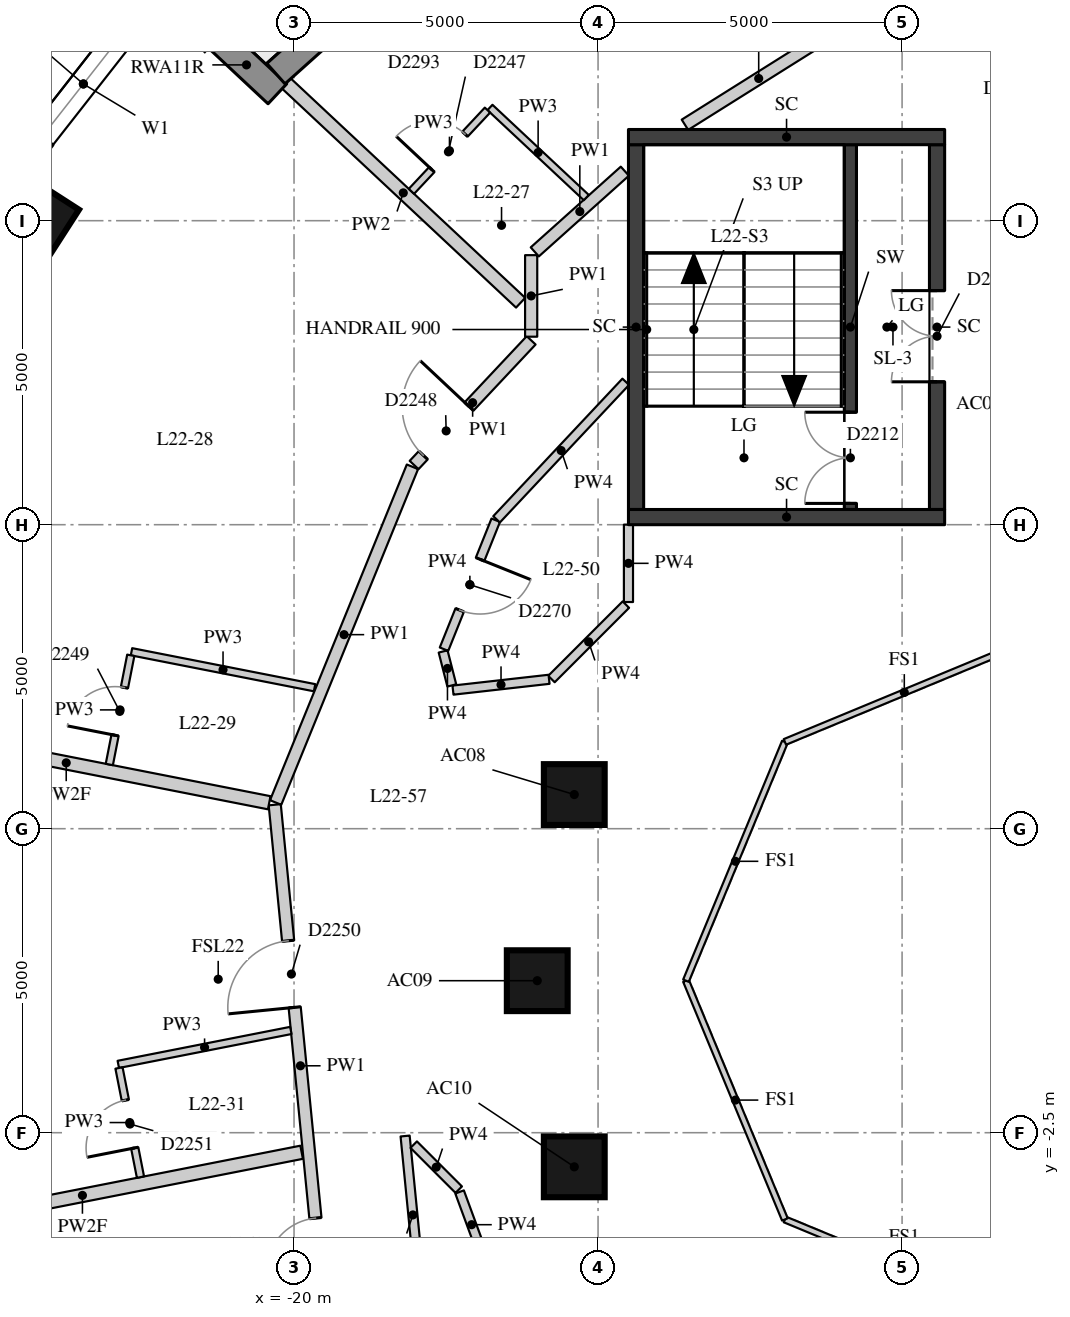
"""IFC4 building model, lengths in metres.
Left out: names, types, materials, properties, quantities, classifications, styles, units other than length and angle.
Written with IfcOpenShell. Run it as: python <this file> out.ifc"""

import sys

from ifc_helpers import new_model, si_unit, direction, frame, frame_2d, origin, origin_2d, place, context, subcontext, project, spatial, rectangle, extrude, element, fill, save


model = new_model("IFC4")
c1 = context("Model", 3, precision=1e-05, world=origin(), true_north=direction((0.0, 1.0)))
c2 = subcontext(c1, "Body", "Model", "MODEL_VIEW")
j1 = project(units=[si_unit("LENGTHUNIT", "METRE"), si_unit("PLANEANGLEUNIT", "RADIAN")], contexts=[c1])
p1 = place(None, origin())
s1 = spatial("IfcSite", under=j1, at=p1, CompositionType="ELEMENT")
p2 = place(p1, origin())
s2 = spatial("IfcBuilding", under=s1, at=p2, CompositionType="ELEMENT")
p3 = place(p2, frame((0.0, 0.0, 81.1)))
s3 = spatial("IfcBuildingStorey", under=s2, at=p3, CompositionType="ELEMENT", Elevation=81.1)
p4 = place(p3, frame((-24.465, 12.625, 0.0), z_axis=(0.0, 0.0, 1.0), x_axis=(-0.840753565229, 0.541417992456, 0.0)))
e1 = element("IfcColumn", 1, at=p4, inside=s3, PredefinedType="COLUMN", context=c2, shape_type="SweptSolid", body=[
    extrude(rectangle(XDim=1.5, YDim=1.1, at=origin_2d()), origin(), (0.0, 0.0, 1.0), 3.3),
])
for number, where, z_axis, x_axis in (
    (2, (-15.391, 3.062, 0.0), (0.0, 0.0, 1.0), (1.0, 0.0, 0.0)),
    (3, (-16.0, 0.0, 0.0), (0.0, 0.0, 1.0), (1.0, 0.0, 0.0)),
    (4, (-15.391, -3.062, 0.0), (0.0, 0.0, 1.0), (1.0, 0.0, 0.0)),
):
    element("IfcColumn", number, at=place(p3, frame(where, z_axis=z_axis, x_axis=x_axis)), inside=s3, PredefinedType="COLUMN", context=c2, shape_type="SweptSolid", body=[
        extrude(rectangle(XDim=1.0, YDim=1.0, at=origin_2d()), origin(), (0.0, 0.0, 1.0), 3.3),
    ])
p5 = place(p3, frame((-22.352, 16.17, 0.0), z_axis=(0.0, 0.0, 1.0), x_axis=(-0.616661975264, -0.787228053529, 0.0)))
e5 = element("IfcWall", 5, at=p5, inside=s3, PredefinedType="SOLIDWALL", context=c2, shape_type="SweptSolid", body=[
    extrude(rectangle(XDim=3.61, YDim=0.45, at=frame_2d((1.805, 0.0))), origin(), (0.0, 0.0, 1.0), 2.85),
])
p6 = place(p5, frame((0.705, 0.0, 0.4)))
e6 = element("IfcOpeningElement", 6, at=p6, cuts=e5, PredefinedType="OPENING", context=c2, shape_type="SweptSolid", body=[
    extrude(rectangle(XDim=2.2, YDim=1.75, at=frame_2d((1.1, 0.875))), frame((0.0, 0.235, 0.0), z_axis=(0.0, -1.0, 0.0), x_axis=(1.0, 0.0, 0.0)), (0.0, 0.0, 1.0), 0.47),
])
p7 = place(p3, frame((-21.289, 15.538, 0.0), z_axis=(0.0, 0.0, 1.0), x_axis=(0.730149942784, -0.683286953668, 0.0)))
e7 = element("IfcWall", 7, at=p7, inside=s3, PredefinedType="SOLIDWALL", context=c2, shape_type="SweptSolid", body=[
    extrude(rectangle(XDim=1.391, YDim=0.45, at=frame_2d((0.695, 0.0))), origin(), (0.0, 0.0, 1.0), 2.85),
])
p8 = place(p3, frame((-17.048, 17.832, 0.0), z_axis=(0.0, 0.0, 1.0), x_axis=(-0.744619286768, -0.667489413978, 0.0)))
e8 = element("IfcWall", 8, at=p8, inside=s3, PredefinedType="SOLIDWALL", context=c2, shape_type="SweptSolid", body=[
    extrude(rectangle(XDim=4.365, YDim=0.45, at=frame_2d((2.183, 0.0))), origin(), (0.0, 0.0, 1.0), 2.85),
])
p9 = place(p8, frame((1.107, 0.0, 0.4)))
e9 = element("IfcOpeningElement", 9, at=p9, cuts=e8, PredefinedType="OPENING", context=c2, shape_type="SweptSolid", body=[
    extrude(rectangle(XDim=1.0, YDim=1.75, at=frame_2d((0.5, 0.875))), frame((0.0, 0.235, 0.0), z_axis=(0.0, -1.0, 0.0), x_axis=(1.0, 0.0, 0.0)), (0.0, 0.0, 1.0), 0.47),
])
p10 = place(p8, frame((2.258, 0.0, 0.0)))
e10 = element("IfcOpeningElement", 10, at=p10, cuts=e8, PredefinedType="OPENING", context=c2, shape_type="SweptSolid", body=[
    extrude(rectangle(XDim=1.0, YDim=2.15, at=frame_2d((0.5, 1.075))), frame((0.0, 0.235, 0.0), z_axis=(0.0, -1.0, 0.0), x_axis=(1.0, 0.0, 0.0)), (0.0, 0.0, 1.0), 0.47),
])
p11 = place(p3, frame((-10.85, 7.75, 0.0), z_axis=(0.0, 0.0, 1.0), x_axis=(0.0, 1.0, 0.0)))
e11 = element("IfcWall", 11, at=p11, inside=s3, PredefinedType="SHEAR", context=c2, shape_type="SweptSolid", body=[
    extrude(rectangle(XDim=6.0, YDim=0.2, at=frame_2d((3.0, 0.0))), origin(), (0.0, 0.0, 1.0), 2.85),
])
p12 = place(p11, frame((0.1, 0.0, 0.0)))
e12 = element("IfcOpeningElement", 12, at=p12, cuts=e11, PredefinedType="OPENING", context=c2, shape_type="SweptSolid", body=[
    extrude(rectangle(XDim=1.5, YDim=2.1, at=frame_2d((0.75, 1.05))), frame((0.0, 0.11, 0.0), z_axis=(0.0, -1.0, 0.0), x_axis=(1.0, 0.0, 0.0)), (0.0, 0.0, 1.0), 0.22),
])
p13 = place(p3, frame((-14.375, 7.75, -0.28), z_axis=(0.0, 0.0, 1.0), x_axis=(0.0, 1.0, 0.0)))
e13 = element("IfcWall", 13, at=p13, inside=s3, PredefinedType="SHEAR", context=c2, shape_type="SweptSolid", body=[
    extrude(rectangle(XDim=6.0, YDim=0.25, at=frame_2d((3.0, 0.0))), origin(), (0.0, 0.0, 1.0), 3.13),
])
p14 = place(p3, frame((-9.425, 7.75, -0.28), z_axis=(0.0, 0.0, 1.0), x_axis=(0.0, 1.0, 0.0)))
e14 = element("IfcWall", 14, at=p14, inside=s3, PredefinedType="SHEAR", context=c2, shape_type="SweptSolid", body=[
    extrude(rectangle(XDim=6.0, YDim=0.25, at=frame_2d((3.0, 0.0))), origin(), (0.0, 0.0, 1.0), 3.13),
])
p15 = place(p14, frame((2.1, 0.0, 0.28)))
e15 = element("IfcOpeningElement", 15, at=p15, cuts=e14, PredefinedType="OPENING", context=c2, shape_type="SweptSolid", body=[
    extrude(rectangle(XDim=1.5, YDim=2.1, at=frame_2d((0.75, 1.05))), frame((0.0, 0.135, 0.0), z_axis=(0.0, -1.0, 0.0), x_axis=(1.0, 0.0, 0.0)), (0.0, 0.0, 1.0), 0.27),
])
for number, where, z_axis, x_axis in (
    (16, (-14.5, 13.875, -0.28), (0.0, 0.0, 1.0), (1.0, 0.0, 0.0)),
    (17, (-14.5, 7.625, -0.28), (0.0, 0.0, 1.0), (1.0, 0.0, 0.0)),
):
    element("IfcWall", number, at=place(p3, frame(where, z_axis=z_axis, x_axis=x_axis)), inside=s3, PredefinedType="SHEAR", context=c2, shape_type="SweptSolid", body=[
        extrude(rectangle(XDim=5.2, YDim=0.25, at=frame_2d((2.6, 0.0))), origin(), (0.0, 0.0, 1.0), 3.13),
    ])
p16 = place(p3, frame((-19.472, -5.693, 0.0), z_axis=(0.0, 0.0, 1.0), x_axis=(-0.097987963337, 0.995187599923, 0.0)))
e18 = element("IfcWall", 18, at=p16, inside=s3, PredefinedType="PARTITIONING", context=c2, shape_type="SweptSolid", body=[
    extrude(rectangle(XDim=8.628, YDim=0.2, at=frame_2d((4.314, 0.0))), origin(), (0.0, 0.0, 1.0), 2.85),
])
p17 = place(p16, frame((5.28, 0.0, 0.0)))
e19 = element("IfcOpeningElement", 19, at=p17, cuts=e18, PredefinedType="OPENING", context=c2, shape_type="SweptSolid", body=[
    extrude(rectangle(XDim=1.1, YDim=2.1, at=frame_2d((0.55, 1.05))), frame((0.0, 0.11, 0.0), z_axis=(0.0, -1.0, 0.0), x_axis=(1.0, 0.0, 0.0)), (0.0, 0.0, 1.0), 0.22),
])
p18 = place(p16, frame((0.896, 0.0, 0.0)))
e20 = element("IfcOpeningElement", 20, at=p18, cuts=e18, PredefinedType="OPENING", context=c2, shape_type="SweptSolid", body=[
    extrude(rectangle(XDim=0.9, YDim=2.1, at=frame_2d((0.45, 1.05))), frame((0.0, 0.11, 0.0), z_axis=(0.0, -1.0, 0.0), x_axis=(1.0, 0.0, 0.0)), (0.0, 0.0, 1.0), 0.22),
])
p19 = place(p3, frame((-20.302, 2.931, 0.0), z_axis=(0.0, 0.0, 1.0), x_axis=(0.377348916571, 0.926071160961, 0.0)))
e21 = element("IfcWall", 21, at=p19, inside=s3, PredefinedType="PARTITIONING", context=c2, shape_type="SweptSolid", body=[
    extrude(rectangle(XDim=5.962, YDim=0.2, at=frame_2d((2.981, 0.0))), origin(), (0.0, 0.0, 1.0), 2.85),
])
p20 = place(p3, frame((-18.025, 8.481, 0.0), z_axis=(0.0, 0.0, 1.0), x_axis=(0.684446266357, 0.729063308958, 0.0)))
e22 = element("IfcWall", 22, at=p20, inside=s3, PredefinedType="PARTITIONING", context=c2, shape_type="SweptSolid", body=[
    extrude(rectangle(XDim=2.812, YDim=0.2, at=frame_2d((1.406, 0.0))), origin(), (0.0, 0.0, 1.0), 2.85),
])
p21 = place(p20, frame((0.22, 0.0, 0.0)))
e23 = element("IfcOpeningElement", 23, at=p21, cuts=e22, PredefinedType="OPENING", context=c2, shape_type="SweptSolid", body=[
    extrude(rectangle(XDim=1.1, YDim=2.1, at=frame_2d((0.55, 1.05))), frame((0.0, 0.11, 0.0), z_axis=(0.0, -1.0, 0.0), x_axis=(1.0, 0.0, 0.0)), (0.0, 0.0, 1.0), 0.22),
])
p22 = place(p3, frame((-16.1, 10.592, 0.0), z_axis=(0.0, 0.0, 1.0), x_axis=(0.0, 1.0, 0.0)))
e24 = element("IfcWall", 24, at=p22, inside=s3, PredefinedType="PARTITIONING", context=c2, shape_type="SweptSolid", body=[
    extrude(rectangle(XDim=1.341, YDim=0.2, at=frame_2d((0.67, 0.0))), origin(), (0.0, 0.0, 1.0), 2.85),
])
p23 = place(p3, frame((-16.041, 11.987, 0.0), z_axis=(0.0, 0.0, 1.0), x_axis=(0.744714584968, 0.66738308859, 0.0)))
e25 = element("IfcWall", 25, at=p23, inside=s3, PredefinedType="PARTITIONING", context=c2, shape_type="SweptSolid", body=[
    extrude(rectangle(XDim=1.989, YDim=0.2, at=frame_2d((0.995, 0.0))), origin(), (0.0, 0.0, 1.0), 2.85),
])
p24 = place(p3, frame((-13.571, 14.077, 0.0), z_axis=(0.0, 0.0, 1.0), x_axis=(0.84693819774, 0.53169134769, 0.0)))
e26 = element("IfcWall", 26, at=p24, inside=s3, PredefinedType="PARTITIONING", context=c2, shape_type="SweptSolid", body=[
    extrude(rectangle(XDim=2.864, YDim=0.2, at=frame_2d((1.432, 0.0))), origin(), (0.0, 0.0, 1.0), 2.85),
])
p25 = place(p3, frame((-14.5, 7.501, 0.0), z_axis=(0.0, 0.0, 1.0), x_axis=(0.0, -1.0, 0.0)))
e27 = element("IfcWall", 27, at=p25, inside=s3, PredefinedType="PARTITIONING", context=c2, shape_type="SweptSolid", body=[
    extrude(rectangle(XDim=1.273, YDim=0.15, at=frame_2d((0.636, 0.0))), origin(), (0.0, 0.0, 1.0), 2.85),
])
p26 = place(p3, frame((-14.542, 6.186, 0.0), z_axis=(0.0, 0.0, 1.0), x_axis=(-0.707036257397, -0.707177297943, 0.0)))
e28 = element("IfcWall", 28, at=p26, inside=s3, PredefinedType="PARTITIONING", context=c2, shape_type="SweptSolid", body=[
    extrude(rectangle(XDim=1.731, YDim=0.15, at=frame_2d((0.865, 0.0))), origin(), (0.0, 0.0, 1.0), 2.85),
])
p27 = place(p3, frame((-15.806, 4.957, 0.0), z_axis=(0.0, 0.0, 1.0), x_axis=(-0.993714030989, -0.111948312253, 0.0)))
e29 = element("IfcWall", 29, at=p27, inside=s3, PredefinedType="PARTITIONING", context=c2, shape_type="SweptSolid", body=[
    extrude(rectangle(XDim=1.59, YDim=0.15, at=frame_2d((0.795, 0.0))), origin(), (0.0, 0.0, 1.0), 2.85),
])
p28 = place(p3, frame((-17.405, 4.856, 0.0), z_axis=(0.0, 0.0, 1.0), x_axis=(-0.247510009529, 0.968885336447, 0.0)))
e30 = element("IfcWall", 30, at=p28, inside=s3, PredefinedType="PARTITIONING", context=c2, shape_type="SweptSolid", body=[
    extrude(rectangle(XDim=0.577, YDim=0.15, at=frame_2d((0.289, 0.0))), origin(), (0.0, 0.0, 1.0), 2.85),
])
p29 = place(p3, frame((-17.533, 5.452, 0.0), z_axis=(0.0, 0.0, 1.0), x_axis=(0.372293007078, 0.928115249783, 0.0)))
e31 = element("IfcWall", 31, at=p29, inside=s3, PredefinedType="PARTITIONING", context=c2, shape_type="SweptSolid", body=[
    extrude(rectangle(XDim=2.285, YDim=0.15, at=frame_2d((1.143, 0.0))), origin(), (0.0, 0.0, 1.0), 2.85),
])
p30 = place(p29, frame((0.693, 0.0, 0.0)))
e32 = element("IfcOpeningElement", 32, at=p30, cuts=e31, PredefinedType="OPENING", context=c2, shape_type="SweptSolid", body=[
    extrude(rectangle(XDim=0.9, YDim=2.1, at=frame_2d((0.45, 1.05))), frame((0.0, 0.085, 0.0), z_axis=(0.0, -1.0, 0.0), x_axis=(1.0, 0.0, 0.0)), (0.0, 0.0, 1.0), 0.17),
])
p31 = place(p3, frame((-16.669, 7.588, 0.0), z_axis=(0.0, 0.0, 1.0), x_axis=(0.684493083222, 0.729019354353, 0.0)))
e33 = element("IfcWall", 33, at=p31, inside=s3, PredefinedType="PARTITIONING", context=c2, shape_type="SweptSolid", body=[
    extrude(rectangle(XDim=3.104, YDim=0.15, at=frame_2d((1.552, 0.0))), origin(), (0.0, 0.0, 1.0), 2.85),
])
p32 = place(p3, frame((-17.917, -5.15, 0.0), z_axis=(0.0, 0.0, 1.0), x_axis=(-0.098011382053, 0.995185293796, 0.0)))
e34 = element("IfcWall", 34, at=p32, inside=s3, PredefinedType="PARTITIONING", context=c2, shape_type="SweptSolid", body=[
    extrude(rectangle(XDim=2.608, YDim=0.15, at=frame_2d((1.304, 0.0))), origin(), (0.0, 0.0, 1.0), 2.85),
])
p33 = place(p3, frame((-18.031, -2.696, 0.0), z_axis=(0.0, 0.0, 1.0), x_axis=(0.706990221924, -0.707223321239, 0.0)))
e35 = element("IfcWall", 35, at=p33, inside=s3, PredefinedType="PARTITIONING", context=c2, shape_type="SweptSolid", body=[
    extrude(rectangle(XDim=1.047, YDim=0.15, at=frame_2d((0.524, 0.0))), origin(), (0.0, 0.0, 1.0), 2.85),
])
p34 = place(p3, frame((-17.277, -3.475, 0.0), z_axis=(0.0, 0.0, 1.0), x_axis=(0.345498312946, -0.938419370938, 0.0)))
e36 = element("IfcWall", 36, at=p34, inside=s3, PredefinedType="PARTITIONING", context=c2, shape_type="SweptSolid", body=[
    extrude(rectangle(XDim=1.147, YDim=0.15, at=frame_2d((0.574, 0.0))), origin(), (0.0, 0.0, 1.0), 2.85),
])
p35 = place(p3, frame((-20.133, 14.764, 0.0), z_axis=(0.0, 0.0, 1.0), x_axis=(0.730064043032, -0.68337873326, 0.0)))
e37 = element("IfcWall", 37, at=p35, inside=s3, PredefinedType="PARTITIONING", context=c2, shape_type="SweptSolid", body=[
    extrude(rectangle(XDim=5.287, YDim=0.22, at=frame_2d((2.644, 0.0))), origin(), (0.0, 0.0, 1.0), 2.85),
])
p36 = place(p3, frame((-27.085, 4.24, 0.0), z_axis=(0.0, 0.0, 1.0), x_axis=(0.981200805451, -0.192989583608, 0.0)))
e38 = element("IfcWall", 38, at=p36, inside=s3, PredefinedType="PARTITIONING", context=c2, shape_type="SweptSolid", body=[
    extrude(rectangle(XDim=6.805, YDim=0.22, at=frame_2d((3.402, 0.0))), origin(), (0.0, 0.0, 1.0), 2.3),
])
p37 = place(p3, frame((-27.085, -4.24, 0.0), z_axis=(0.0, 0.0, 1.0), x_axis=(0.981198066788, 0.193003507042, 0.0)))
e39 = element("IfcWall", 39, at=p37, inside=s3, PredefinedType="PARTITIONING", context=c2, shape_type="SweptSolid", body=[
    extrude(rectangle(XDim=7.348, YDim=0.22, at=frame_2d((3.674, 0.0))), origin(), (0.0, 0.0, 1.0), 2.3),
])
p38 = place(p3, frame((-15.194, 12.88, 0.0), z_axis=(0.0, 0.0, 1.0), x_axis=(-0.730070370792, 0.683371973153, 0.0)))
e40 = element("IfcWall", 40, at=p38, inside=s3, PredefinedType="PARTITIONING", context=c2, shape_type="SweptSolid", body=[
    extrude(rectangle(XDim=2.17, YDim=0.12, at=frame_2d((1.085, 0.0))), origin(), (0.0, 0.0, 1.0), 2.85),
])
p39 = place(p3, frame((-19.662, 4.819, 0.0), z_axis=(0.0, 0.0, 1.0), x_axis=(-0.981227049162, 0.192856106963, 0.0)))
e41 = element("IfcWall", 41, at=p39, inside=s3, PredefinedType="PARTITIONING", context=c2, shape_type="SweptSolid", body=[
    extrude(rectangle(XDim=3.069, YDim=0.12, at=frame_2d((1.534, 0.0))), origin(), (0.0, 0.0, 1.0), 2.85),
])
p40 = place(p3, frame((-20.052, -0.818, 0.0), z_axis=(0.0, 0.0, 1.0), x_axis=(-0.981205462312, -0.192965905613, 0.0)))
e42 = element("IfcWall", 42, at=p40, inside=s3, PredefinedType="PARTITIONING", context=c2, shape_type="SweptSolid", body=[
    extrude(rectangle(XDim=2.892, YDim=0.12, at=frame_2d((1.446, 0.0))), origin(), (0.0, 0.0, 1.0), 2.85),
])
p41 = place(p3, frame((-16.819, 14.319, 0.0), z_axis=(0.0, 0.0, 1.0), x_axis=(-0.683372850006, -0.730069550026, 0.0)))
e43 = element("IfcWall", 43, at=p41, inside=s3, PredefinedType="PARTITIONING", context=c2, shape_type="SweptSolid", body=[
    extrude(rectangle(XDim=1.83, YDim=0.12, at=frame_2d((0.915, 0.0))), origin(), (0.0, 0.0, 1.0), 2.85),
])
p42 = place(p41, frame((0.54, 0.0, 0.0)))
e44 = element("IfcOpeningElement", 44, at=p42, cuts=e43, PredefinedType="OPENING", context=c2, shape_type="SweptSolid", body=[
    extrude(rectangle(XDim=0.8, YDim=2.1, at=frame_2d((0.4, 1.05))), frame((0.0, 0.07, 0.0), z_axis=(0.0, -1.0, 0.0), x_axis=(1.0, 0.0, 0.0)), (0.0, 0.0, 1.0), 0.14),
])
p43 = place(p3, frame((-22.685, 5.352, 0.0), z_axis=(0.0, 0.0, 1.0), x_axis=(-0.192908160061, -0.981216816907, 0.0)))
e45 = element("IfcWall", 45, at=p43, inside=s3, PredefinedType="PARTITIONING", context=c2, shape_type="SweptSolid", body=[
    extrude(rectangle(XDim=1.83, YDim=0.12, at=frame_2d((0.915, 0.0))), origin(), (0.0, 0.0, 1.0), 2.85),
])
p44 = place(p43, frame((0.54, 0.0, 0.0)))
e46 = element("IfcOpeningElement", 46, at=p44, cuts=e45, PredefinedType="OPENING", context=c2, shape_type="SweptSolid", body=[
    extrude(rectangle(XDim=0.8, YDim=2.1, at=frame_2d((0.4, 1.05))), frame((0.0, 0.07, 0.0), z_axis=(0.0, -1.0, 0.0), x_axis=(1.0, 0.0, 0.0)), (0.0, 0.0, 1.0), 0.14),
])
p45 = place(p3, frame((-22.879, -1.435, 0.0), z_axis=(0.0, 0.0, 1.0), x_axis=(0.193036598643, -0.981191557029, 0.0)))
e47 = element("IfcWall", 47, at=p45, inside=s3, PredefinedType="PARTITIONING", context=c2, shape_type="SweptSolid", body=[
    extrude(rectangle(XDim=1.83, YDim=0.12, at=frame_2d((0.915, 0.0))), origin(), (0.0, 0.0, 1.0), 2.85),
])
p46 = place(p45, frame((0.54, 0.0, 0.0)))
e48 = element("IfcOpeningElement", 48, at=p46, cuts=e47, PredefinedType="OPENING", context=c2, shape_type="SweptSolid", body=[
    extrude(rectangle(XDim=0.8, YDim=2.1, at=frame_2d((0.4, 1.05))), frame((0.0, 0.07, 0.0), z_axis=(0.0, -1.0, 0.0), x_axis=(1.0, 0.0, 0.0)), (0.0, 0.0, 1.0), 0.14),
])
for number, where, z_axis, x_axis in (
    (49, (-8.0, -5.554, 0.0), (0.0, 0.0, 1.0), (-0.924, 0.383, 0.0)),
    (50, (-11.927, -3.927, 0.0), (0.0, 0.0, 1.0), (-0.383, 0.924, 0.0)),
    (51, (-13.554, 0.0, 0.0), (0.0, 0.0, 1.0), (0.383, 0.924, 0.0)),
    (52, (-11.927, 3.927, 0.0), (0.0, 0.0, 1.0), (0.924, 0.383, 0.0)),
):
    element("IfcWall", number, at=place(p3, frame(where, z_axis=z_axis, x_axis=x_axis)), inside=s3, PredefinedType="PARTITIONING", context=c2, shape_type="SweptSolid", body=[
        extrude(rectangle(XDim=4.251, YDim=0.1, at=frame_2d((2.125, 0.0))), origin(), (0.0, 0.0, 1.0), 2.85),
    ])
p47 = place(p6, origin())
e53 = element("IfcWindow", 53, at=p47, inside=s3, PartitioningType="SINGLE_PANEL", PredefinedType="WINDOW", context=c2, shape_type="SweptSolid", body=[
    extrude(rectangle(XDim=2.2, YDim=1.75, at=frame_2d((1.1, 0.875))), frame((0.0, 0.035, 0.0), z_axis=(0.0, -1.0, 0.0), x_axis=(1.0, 0.0, 0.0)), (0.0, 0.0, 1.0), 0.06),
])
fill(e6, e53)
p48 = place(p12, origin())
e54 = element("IfcDoor", 54, at=p48, inside=s3, OperationType="DOUBLE_DOOR_SINGLE_SWING", PredefinedType="DOOR", context=c2, shape_type="SweptSolid", body=[
    extrude(rectangle(XDim=1.5, YDim=2.1, at=frame_2d((0.75, 1.05))), frame((0.0, 0.025, 0.0), z_axis=(0.0, -1.0, 0.0), x_axis=(1.0, 0.0, 0.0)), (0.0, 0.0, 1.0), 0.05),
])
fill(e12, e54)
p49 = place(p15, origin())
e55 = element("IfcDoor", 55, at=p49, inside=s3, OperationType="DOUBLE_DOOR_SINGLE_SWING", PredefinedType="DOOR", context=c2, shape_type="SweptSolid", body=[
    extrude(rectangle(XDim=1.5, YDim=2.1, at=frame_2d((0.75, 1.05))), frame((0.0, 0.025, 0.0), z_axis=(0.0, -1.0, 0.0), x_axis=(1.0, 0.0, 0.0)), (0.0, 0.0, 1.0), 0.05),
])
fill(e15, e55)
p50 = place(p42, origin())
e56 = element("IfcDoor", 56, at=p50, inside=s3, OperationType="SINGLE_SWING_LEFT", PredefinedType="DOOR", context=c2, shape_type="SweptSolid", body=[
    extrude(rectangle(XDim=0.8, YDim=2.1, at=frame_2d((0.4, 1.05))), frame((0.0, 0.025, 0.0), z_axis=(0.0, -1.0, 0.0), x_axis=(1.0, 0.0, 0.0)), (0.0, 0.0, 1.0), 0.05),
])
fill(e44, e56)
p51 = place(p21, origin())
e57 = element("IfcDoor", 57, at=p51, inside=s3, OperationType="SINGLE_SWING_RIGHT", PredefinedType="DOOR", context=c2, shape_type="SweptSolid", body=[
    extrude(rectangle(XDim=1.1, YDim=2.1, at=frame_2d((0.55, 1.05))), frame((0.0, 0.025, 0.0), z_axis=(0.0, -1.0, 0.0), x_axis=(1.0, 0.0, 0.0)), (0.0, 0.0, 1.0), 0.05),
])
fill(e23, e57)
p52 = place(p44, origin())
e58 = element("IfcDoor", 58, at=p52, inside=s3, OperationType="SINGLE_SWING_LEFT", PredefinedType="DOOR", context=c2, shape_type="SweptSolid", body=[
    extrude(rectangle(XDim=0.8, YDim=2.1, at=frame_2d((0.4, 1.05))), frame((0.0, 0.025, 0.0), z_axis=(0.0, -1.0, 0.0), x_axis=(1.0, 0.0, 0.0)), (0.0, 0.0, 1.0), 0.05),
])
fill(e46, e58)
p53 = place(p17, origin())
e59 = element("IfcDoor", 59, at=p53, inside=s3, OperationType="SINGLE_SWING_LEFT", PredefinedType="DOOR", context=c2, shape_type="SweptSolid", body=[
    extrude(rectangle(XDim=1.1, YDim=2.1, at=frame_2d((0.55, 1.05))), frame((0.0, 0.025, 0.0), z_axis=(0.0, -1.0, 0.0), x_axis=(1.0, 0.0, 0.0)), (0.0, 0.0, 1.0), 0.05),
])
fill(e19, e59)
p54 = place(p46, origin())
e60 = element("IfcDoor", 60, at=p54, inside=s3, OperationType="SINGLE_SWING_LEFT", PredefinedType="DOOR", context=c2, shape_type="SweptSolid", body=[
    extrude(rectangle(XDim=0.8, YDim=2.1, at=frame_2d((0.4, 1.05))), frame((0.0, 0.025, 0.0), z_axis=(0.0, -1.0, 0.0), x_axis=(1.0, 0.0, 0.0)), (0.0, 0.0, 1.0), 0.05),
])
fill(e48, e60)
p55 = place(p18, origin())
e61 = element("IfcDoor", 61, at=p55, inside=s3, OperationType="SINGLE_SWING_LEFT", PredefinedType="DOOR", context=c2, shape_type="SweptSolid", body=[
    extrude(rectangle(XDim=0.9, YDim=2.1, at=frame_2d((0.45, 1.05))), frame((0.0, 0.025, 0.0), z_axis=(0.0, -1.0, 0.0), x_axis=(1.0, 0.0, 0.0)), (0.0, 0.0, 1.0), 0.05),
])
fill(e20, e61)
p56 = place(p30, origin())
e62 = element("IfcDoor", 62, at=p56, inside=s3, OperationType="SINGLE_SWING_LEFT", PredefinedType="DOOR", context=c2, shape_type="SweptSolid", body=[
    extrude(rectangle(XDim=0.9, YDim=2.1, at=frame_2d((0.45, 1.05))), frame((0.0, 0.025, 0.0), z_axis=(0.0, -1.0, 0.0), x_axis=(1.0, 0.0, 0.0)), (0.0, 0.0, 1.0), 0.05),
])
fill(e32, e62)
save(model, sys.argv[1])
